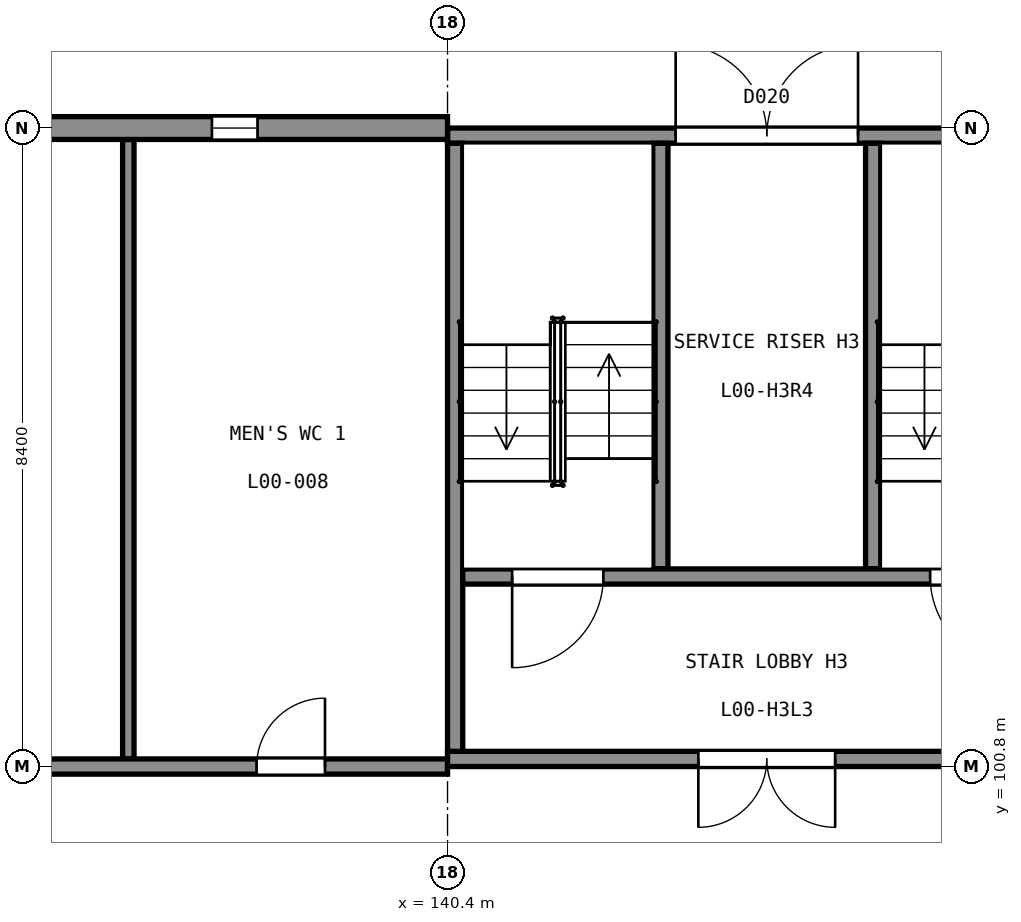
"""IFC4 building model, lengths in metres.
Left out: names, types, materials, properties, quantities, classifications, styles, units other than length and angle.
Written with IfcOpenShell. Run it as: python <this file> out.ifc"""

import sys

from ifc_helpers import new_model, si_unit, direction, frame, frame_2d, origin, place, context, subcontext, project, spatial, rectangle, extrude, element, fill, save


model = new_model("IFC4")
c1 = context("Model", 3, precision=1e-05, world=origin(), true_north=direction((0.0, 1.0)))
c2 = subcontext(c1, "Body", "Model", "MODEL_VIEW")
j1 = project(units=[si_unit("LENGTHUNIT", "METRE"), si_unit("PLANEANGLEUNIT", "RADIAN")], contexts=[c1])
p1 = place(None, origin())
s1 = spatial("IfcSite", under=j1, at=p1, CompositionType="ELEMENT")
p2 = place(p1, origin())
s2 = spatial("IfcBuilding", under=s1, at=p2, CompositionType="ELEMENT")
p3 = place(p2, origin())
s3 = spatial("IfcBuildingStorey", under=s2, at=p3, CompositionType="ELEMENT", Elevation=0.0)
p4 = place(p3, frame((140.4, 100.9, -1.8), z_axis=(0.0, 0.0, 1.0), x_axis=(1.0, 0.0, 0.0)))
e1 = element("IfcWall", 1, at=p4, inside=s3, PredefinedType="SHEAR", context=c2, shape_type="SweptSolid", body=[
    extrude(rectangle(XDim=8.4, YDim=0.2, at=frame_2d((4.2, 0.0))), origin(), (0.0, 0.0, 1.0), 7.3),
])
p5 = place(p4, frame((3.3, 0.0, 1.8)))
e2 = element("IfcOpeningElement", 2, at=p5, cuts=e1, PredefinedType="OPENING", context=c2, shape_type="SweptSolid", body=[
    extrude(rectangle(XDim=1.8, YDim=2.1, at=frame_2d((0.9, 1.05))), frame((0.0, 0.11, 0.0), z_axis=(0.0, -1.0, 0.0), x_axis=(1.0, 0.0, 0.0)), (0.0, 0.0, 1.0), 0.22),
])
p6 = place(p3, frame((140.4, 109.1, -1.8), z_axis=(0.0, 0.0, 1.0), x_axis=(1.0, 0.0, 0.0)))
e3 = element("IfcWall", 3, at=p6, inside=s3, PredefinedType="SHEAR", context=c2, shape_type="SweptSolid", body=[
    extrude(rectangle(XDim=8.4, YDim=0.2, at=frame_2d((4.2, 0.0))), origin(), (0.0, 0.0, 1.0), 7.3),
])
p7 = place(p6, frame((3.001, 0.0, 1.8)))
e4 = element("IfcOpeningElement", 4, at=p7, cuts=e3, PredefinedType="OPENING", context=c2, shape_type="SweptSolid", body=[
    extrude(rectangle(XDim=2.4, YDim=2.1, at=frame_2d((1.2, 1.05))), frame((0.0, 0.11, 0.0), z_axis=(0.0, -1.0, 0.0), x_axis=(1.0, 0.0, 0.0)), (0.0, 0.0, 1.0), 0.22),
])
p8 = place(p3, frame((140.5, 101.0, -1.8), z_axis=(0.0, 0.0, 1.0), x_axis=(0.0, 1.0, 0.0)))
e5 = element("IfcWall", 5, at=p8, inside=s3, PredefinedType="SHEAR", context=c2, shape_type="SweptSolid", body=[
    extrude(rectangle(XDim=8.0, YDim=0.2, at=frame_2d((4.0, 0.0))), origin(), (0.0, 0.0, 1.0), 7.3),
])
p9 = place(p3, frame((140.6, 103.3, -1.8), z_axis=(0.0, 0.0, 1.0), x_axis=(1.0, 0.0, 0.0)))
e6 = element("IfcWall", 6, at=p9, inside=s3, PredefinedType="SHEAR", context=c2, shape_type="SweptSolid", body=[
    extrude(rectangle(XDim=8.0, YDim=0.2, at=frame_2d((4.0, 0.0))), origin(), (0.0, 0.0, 1.0), 7.3),
])
p10 = place(p9, frame((0.65, 0.0, 1.8)))
e7 = element("IfcOpeningElement", 7, at=p10, cuts=e6, PredefinedType="OPENING", context=c2, shape_type="SweptSolid", body=[
    extrude(rectangle(XDim=1.2, YDim=2.1, at=frame_2d((0.6, 1.05))), frame((0.0, 0.11, 0.0), z_axis=(0.0, -1.0, 0.0), x_axis=(1.0, 0.0, 0.0)), (0.0, 0.0, 1.0), 0.22),
])
p11 = place(p9, frame((6.15, 0.0, 1.8)))
e8 = element("IfcOpeningElement", 8, at=p11, cuts=e6, PredefinedType="OPENING", context=c2, shape_type="SweptSolid", body=[
    extrude(rectangle(XDim=1.2, YDim=2.1, at=frame_2d((0.6, 1.05))), frame((0.0, 0.11, 0.0), z_axis=(0.0, -1.0, 0.0), x_axis=(1.0, 0.0, 0.0)), (0.0, 0.0, 1.0), 0.22),
])
for number, where, z_axis, x_axis in (
    (9, (143.2, 103.4, -1.8), (0.0, 0.0, 1.0), (0.0, 1.0, 0.0)),
    (10, (146.0, 103.4, -1.8), (0.0, 0.0, 1.0), (0.0, 1.0, 0.0)),
):
    element("IfcWall", number, at=place(p3, frame(where, z_axis=z_axis, x_axis=x_axis)), inside=s3, PredefinedType="SHEAR", context=c2, shape_type="SweptSolid", body=[
        extrude(rectangle(XDim=5.6, YDim=0.2, at=frame_2d((2.8, 0.0))), origin(), (0.0, 0.0, 1.0), 7.3),
    ])
p12 = place(p3, frame((132.0, 109.2, 0.0), z_axis=(0.0, 0.0, 1.0), x_axis=(1.0, 0.0, 0.0)))
e11 = element("IfcWall", 11, at=p12, inside=s3, PredefinedType="SOLIDWALL", context=c2, shape_type="SweptSolid", body=[
    extrude(rectangle(XDim=8.4, YDim=0.3, at=frame_2d((4.2, 0.0))), origin(), (0.0, 0.0, 1.0), 4.44),
])
p13 = place(p12, frame((2.5, 0.0, 1.5)))
e12 = element("IfcOpeningElement", 12, at=p13, cuts=e11, PredefinedType="OPENING", context=c2, shape_type="SweptSolid", body=[
    extrude(rectangle(XDim=0.6, YDim=2.4, at=frame_2d((0.3, 1.2))), frame((0.0, 0.16, 0.0), z_axis=(0.0, -1.0, 0.0), x_axis=(1.0, 0.0, 0.0)), (0.0, 0.0, 1.0), 0.32),
])
p14 = place(p12, frame((5.3, 0.0, 1.5)))
e13 = element("IfcOpeningElement", 13, at=p14, cuts=e11, PredefinedType="OPENING", context=c2, shape_type="SweptSolid", body=[
    extrude(rectangle(XDim=0.6, YDim=2.4, at=frame_2d((0.3, 1.2))), frame((0.0, 0.16, 0.0), z_axis=(0.0, -1.0, 0.0), x_axis=(1.0, 0.0, 0.0)), (0.0, 0.0, 1.0), 0.32),
])
p15 = place(p3, frame((136.2, 100.9, 0.0), z_axis=(0.0, 0.0, 1.0), x_axis=(0.0, 1.0, 0.0)))
e14 = element("IfcWall", 14, at=p15, inside=s3, PredefinedType="PARTITIONING", context=c2, shape_type="SweptSolid", body=[
    extrude(rectangle(XDim=8.15, YDim=0.15, at=frame_2d((4.075, 0.0))), origin(), (0.0, 0.0, 1.0), 4.4),
])
p16 = place(p3, frame((132.0, 100.8, 0.0), z_axis=(0.0, 0.0, 1.0), x_axis=(1.0, 0.0, 0.0)))
e15 = element("IfcWall", 15, at=p16, inside=s3, PredefinedType="PARTITIONING", context=c2, shape_type="SweptSolid", body=[
    extrude(rectangle(XDim=8.4, YDim=0.2, at=frame_2d((4.2, 0.0))), origin(), (0.0, 0.0, 1.0), 4.4),
])
p17 = place(p16, frame((1.613, 0.0, 0.0)))
e16 = element("IfcOpeningElement", 16, at=p17, cuts=e15, PredefinedType="OPENING", context=c2, shape_type="SweptSolid", body=[
    extrude(rectangle(XDim=0.9, YDim=2.1, at=frame_2d((0.45, 1.05))), frame((0.0, 0.11, 0.0), z_axis=(0.0, -1.0, 0.0), x_axis=(1.0, 0.0, 0.0)), (0.0, 0.0, 1.0), 0.22),
])
p18 = place(p16, frame((5.887, 0.0, 0.0)))
e17 = element("IfcOpeningElement", 17, at=p18, cuts=e15, PredefinedType="OPENING", context=c2, shape_type="SweptSolid", body=[
    extrude(rectangle(XDim=0.9, YDim=2.1, at=frame_2d((0.45, 1.05))), frame((0.0, 0.11, 0.0), z_axis=(0.0, -1.0, 0.0), x_axis=(1.0, 0.0, 0.0)), (0.0, 0.0, 1.0), 0.22),
])
p19 = place(p14, origin())
e18 = element("IfcWindow", 18, at=p19, inside=s3, PartitioningType="SINGLE_PANEL", PredefinedType="WINDOW", context=c2, shape_type="SweptSolid", body=[
    extrude(rectangle(XDim=0.6, YDim=2.4, at=frame_2d((0.3, 1.2))), frame((0.0, -0.07, 0.0), z_axis=(0.0, -1.0, 0.0), x_axis=(1.0, 0.0, 0.0)), (0.0, 0.0, 1.0), 0.06),
])
fill(e13, e18)
p20 = place(p7, origin())
e19 = element("IfcDoor", 19, at=p20, inside=s3, OperationType="DOUBLE_DOOR_SINGLE_SWING", PredefinedType="DOOR", context=c2, shape_type="SweptSolid", body=[
    extrude(rectangle(XDim=2.4, YDim=2.1, at=frame_2d((1.2, 1.05))), frame((0.0, 0.025, 0.0), z_axis=(0.0, -1.0, 0.0), x_axis=(1.0, 0.0, 0.0)), (0.0, 0.0, 1.0), 0.05),
])
fill(e4, e19)
p21 = place(p18, origin())
e20 = element("IfcDoor", 20, at=p21, inside=s3, OperationType="SINGLE_SWING_LEFT", PredefinedType="DOOR", context=c2, shape_type="SweptSolid", body=[
    extrude(rectangle(XDim=0.9, YDim=2.1, at=frame_2d((0.45, 1.05))), frame((0.0, 0.025, 0.0), z_axis=(0.0, -1.0, 0.0), x_axis=(1.0, 0.0, 0.0)), (0.0, 0.0, 1.0), 0.05),
])
fill(e17, e20)
p22 = place(p5, origin())
e21 = element("IfcDoor", 21, at=p22, inside=s3, OperationType="DOUBLE_DOOR_SINGLE_SWING", PredefinedType="DOOR", context=c2, shape_type="SweptSolid", body=[
    extrude(rectangle(XDim=1.8, YDim=2.1, at=frame_2d((0.9, 1.05))), frame((0.0, 0.025, 0.0), z_axis=(0.0, -1.0, 0.0), x_axis=(1.0, 0.0, 0.0)), (0.0, 0.0, 1.0), 0.05),
])
fill(e2, e21)
p23 = place(p10, origin())
e22 = element("IfcDoor", 22, at=p23, inside=s3, OperationType="SINGLE_SWING_LEFT", PredefinedType="DOOR", context=c2, shape_type="SweptSolid", body=[
    extrude(rectangle(XDim=1.2, YDim=2.1, at=frame_2d((0.6, 1.05))), frame((0.0, 0.025, 0.0), z_axis=(0.0, -1.0, 0.0), x_axis=(1.0, 0.0, 0.0)), (0.0, 0.0, 1.0), 0.05),
])
fill(e7, e22)
p24 = place(p11, origin())
e23 = element("IfcDoor", 23, at=p24, inside=s3, OperationType="SINGLE_SWING_RIGHT", PredefinedType="DOOR", context=c2, shape_type="SweptSolid", body=[
    extrude(rectangle(XDim=1.2, YDim=2.1, at=frame_2d((0.6, 1.05))), frame((0.0, 0.025, 0.0), z_axis=(0.0, -1.0, 0.0), x_axis=(1.0, 0.0, 0.0)), (0.0, 0.0, 1.0), 0.05),
])
fill(e8, e23)
save(model, sys.argv[1])
